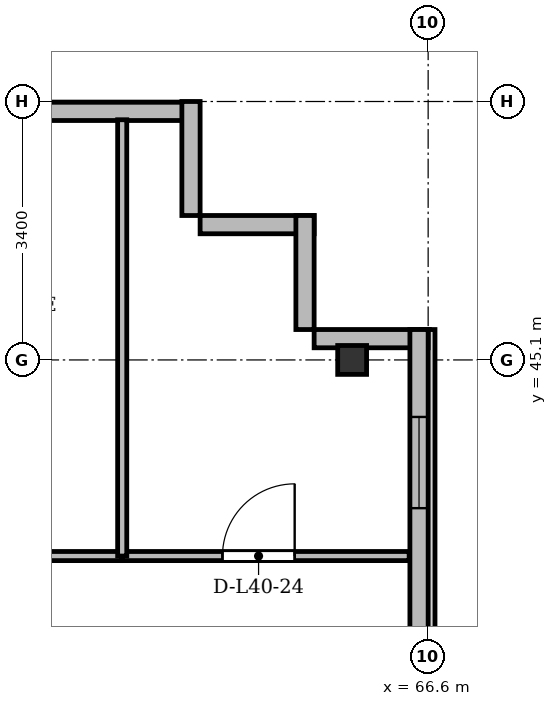
"""IFC4 building model, lengths in metres.
Left out: names, types, materials, properties, quantities, classifications, styles, units other than length and angle.
Written with IfcOpenShell. Run it as: python <this file> out.ifc"""

import sys

from ifc_helpers import new_model, si_unit, direction, frame, frame_2d, origin, origin_2d, place, context, subcontext, project, spatial, rectangle, i_section, extrude, source, transform, mapped, element, fill, save


model = new_model("IFC4")
c1 = context("Model", 3, precision=1e-05, world=origin(), true_north=direction((0.0, 1.0)))
c2 = subcontext(c1, "Body", "Model", "MODEL_VIEW")
j1 = project(units=[si_unit("LENGTHUNIT", "METRE"), si_unit("PLANEANGLEUNIT", "RADIAN")], contexts=[c1])
p1 = place(None, origin())
s1 = spatial("IfcSite", under=j1, at=p1, CompositionType="ELEMENT")
p2 = place(p1, origin())
s2 = spatial("IfcBuilding", under=s1, at=p2, CompositionType="ELEMENT")
p3 = place(p2, frame((0.0, 0.0, 153.7)))
s3 = spatial("IfcBuildingStorey", under=s2, at=p3, CompositionType="ELEMENT", Elevation=153.7)
m1 = source(origin(), c2, "Body", "SweptSolid", [
    extrude(i_section(OverallWidth=0.38, OverallDepth=0.38, WebThickness=0.02, FlangeThickness=0.03, at=origin_2d()), origin(), (0.0, 0.0, 1.0), 3.6),
])
p4 = place(p3, frame((65.6, 45.1, 0.0), z_axis=(0.0, 0.0, 1.0), x_axis=(1.0, 0.0, 0.0)))
e1 = element("IfcColumn", 1, at=p4, inside=s3, PredefinedType="COLUMN", context=c2, shape_type="MappedRepresentation", body=[
    mapped(m1, transform((0.0, 0.0, 0.0), x_axis=(1.0, 0.0, 0.0), y_axis=(0.0, 1.0, 0.0), z_axis=(0.0, 0.0, 1.0), scale=1.0)),
])
p5 = place(p3, frame((58.8, 48.37, 0.0), z_axis=(0.0, 0.0, 1.0), x_axis=(1.0, 0.0, 0.0)))
e2 = element("IfcWall", 2, at=p5, inside=s3, PredefinedType="SOLIDWALL", context=c2, shape_type="SweptSolid", body=[
    extrude(rectangle(XDim=4.7, YDim=0.24, at=frame_2d((2.35, 0.0))), origin(), (0.0, 0.0, 1.0), 3.35),
])
p6 = place(p5, frame((1.368, 0.0, 0.9)))
e3 = element("IfcOpeningElement", 3, at=p6, cuts=e2, PredefinedType="OPENING", context=c2, shape_type="SweptSolid", body=[
    extrude(rectangle(XDim=1.2, YDim=1.65, at=frame_2d((0.6, 0.825))), frame((0.0, 0.13, 0.0), z_axis=(0.0, -1.0, 0.0), x_axis=(1.0, 0.0, 0.0)), (0.0, 0.0, 1.0), 0.26),
])
for number, where, z_axis, x_axis in (
    (4, (63.48, 48.5, 0.0), (0.0, 0.0, 1.0), (0.0, -1.0, 0.0)),
    (5, (63.6, 46.88, 0.0), (0.0, 0.0, 1.0), (1.0, 0.0, 0.0)),
    (6, (64.98, 47.0, 0.0), (0.0, 0.0, 1.0), (0.0, -1.0, 0.0)),
    (7, (65.1, 45.38, 0.0), (0.0, 0.0, 1.0), (1.0, 0.0, 0.0)),
):
    element("IfcWall", number, at=place(p3, frame(where, z_axis=z_axis, x_axis=x_axis)), inside=s3, PredefinedType="SOLIDWALL", context=c2, shape_type="SweptSolid", body=[
        extrude(rectangle(XDim=1.5, YDim=0.24, at=frame_2d((0.75, 0.0))), origin(), (0.0, 0.0, 1.0), 3.35),
    ])
p7 = place(p3, frame((66.48, 45.5, 0.0), z_axis=(0.0, 0.0, 1.0), x_axis=(0.0, -1.0, 0.0)))
e8 = element("IfcWall", 8, at=p7, inside=s3, PredefinedType="SOLIDWALL", context=c2, shape_type="SweptSolid", body=[
    extrude(rectangle(XDim=39.2, YDim=0.24, at=frame_2d((19.6, 0.0))), origin(), (0.0, 0.0, 1.0), 3.35),
])
p8 = place(p7, frame((36.55, 0.0, 0.92)))
e9 = element("IfcOpeningElement", 9, at=p8, cuts=e8, PredefinedType="OPENING", context=c2, shape_type="SweptSolid", body=[
    extrude(rectangle(XDim=1.2, YDim=1.65, at=frame_2d((0.6, 0.825))), frame((0.0, 0.13, 0.0), z_axis=(0.0, -1.0, 0.0), x_axis=(1.0, 0.0, 0.0)), (0.0, 0.0, 1.0), 0.26),
])
p9 = place(p7, frame((32.8, 0.0, 0.92)))
e10 = element("IfcOpeningElement", 10, at=p9, cuts=e8, PredefinedType="OPENING", context=c2, shape_type="SweptSolid", body=[
    extrude(rectangle(XDim=2.6, YDim=1.9, at=frame_2d((1.3, 0.95))), frame((0.0, 0.13, 0.0), z_axis=(0.0, -1.0, 0.0), x_axis=(1.0, 0.0, 0.0)), (0.0, 0.0, 1.0), 0.26),
])
p10 = place(p7, frame((28.6, 0.0, 0.92)))
e11 = element("IfcOpeningElement", 11, at=p10, cuts=e8, PredefinedType="OPENING", context=c2, shape_type="SweptSolid", body=[
    extrude(rectangle(XDim=2.6, YDim=1.9, at=frame_2d((1.3, 0.95))), frame((0.0, 0.13, 0.0), z_axis=(0.0, -1.0, 0.0), x_axis=(1.0, 0.0, 0.0)), (0.0, 0.0, 1.0), 0.26),
])
p11 = place(p7, frame((21.4, 0.0, 0.92)))
e12 = element("IfcOpeningElement", 12, at=p11, cuts=e8, PredefinedType="OPENING", context=c2, shape_type="SweptSolid", body=[
    extrude(rectangle(XDim=2.6, YDim=1.9, at=frame_2d((1.3, 0.95))), frame((0.0, 0.13, 0.0), z_axis=(0.0, -1.0, 0.0), x_axis=(1.0, 0.0, 0.0)), (0.0, 0.0, 1.0), 0.26),
])
p12 = place(p7, frame((7.4, 0.0, 0.92)))
e13 = element("IfcOpeningElement", 13, at=p12, cuts=e8, PredefinedType="OPENING", context=c2, shape_type="SweptSolid", body=[
    extrude(rectangle(XDim=2.6, YDim=1.9, at=frame_2d((1.3, 0.95))), frame((0.0, 0.13, 0.0), z_axis=(0.0, -1.0, 0.0), x_axis=(1.0, 0.0, 0.0)), (0.0, 0.0, 1.0), 0.26),
])
p13 = place(p7, frame((4.5, 0.0, 0.92)))
e14 = element("IfcOpeningElement", 14, at=p13, cuts=e8, PredefinedType="OPENING", context=c2, shape_type="SweptSolid", body=[
    extrude(rectangle(XDim=1.2, YDim=1.65, at=frame_2d((0.6, 0.825))), frame((0.0, 0.13, 0.0), z_axis=(0.0, -1.0, 0.0), x_axis=(1.0, 0.0, 0.0)), (0.0, 0.0, 1.0), 0.26),
])
p14 = place(p7, frame((1.15, 0.0, 0.92)))
e15 = element("IfcOpeningElement", 15, at=p14, cuts=e8, PredefinedType="OPENING", context=c2, shape_type="SweptSolid", body=[
    extrude(rectangle(XDim=1.2, YDim=1.65, at=frame_2d((0.6, 0.825))), frame((0.0, 0.13, 0.0), z_axis=(0.0, -1.0, 0.0), x_axis=(1.0, 0.0, 0.0)), (0.0, 0.0, 1.0), 0.26),
])
p15 = place(p3, frame((58.8, 42.52, 0.0), z_axis=(0.0, 0.0, 1.0), x_axis=(1.0, 0.0, 0.0)))
e16 = element("IfcWall", 16, at=p15, inside=s3, PredefinedType="PARTITIONING", context=c2, shape_type="SweptSolid", body=[
    extrude(rectangle(XDim=3.775, YDim=0.12, at=frame_2d((1.887, 0.0))), origin(), (0.0, 0.0, 1.0), 2.85),
])
p16 = place(p15, frame((1.506, 0.0, 0.0)))
e17 = element("IfcOpeningElement", 17, at=p16, cuts=e16, PredefinedType="OPENING", context=c2, shape_type="SweptSolid", body=[
    extrude(rectangle(XDim=0.95, YDim=2.15, at=frame_2d((0.475, 1.075))), frame((0.0, 0.07, 0.0), z_axis=(0.0, -1.0, 0.0), x_axis=(1.0, 0.0, 0.0)), (0.0, 0.0, 1.0), 0.14),
])
p17 = place(p3, frame((62.575, 42.52, 0.0), z_axis=(0.0, 0.0, 1.0), x_axis=(1.0, 0.0, 0.0)))
e18 = element("IfcWall", 18, at=p17, inside=s3, PredefinedType="PARTITIONING", context=c2, shape_type="SweptSolid", body=[
    extrude(rectangle(XDim=3.775, YDim=0.12, at=frame_2d((1.888, 0.0))), origin(), (0.0, 0.0, 1.0), 2.85),
])
p18 = place(p17, frame((1.319, 0.0, 0.0)))
e19 = element("IfcOpeningElement", 19, at=p18, cuts=e18, PredefinedType="OPENING", context=c2, shape_type="SweptSolid", body=[
    extrude(rectangle(XDim=0.95, YDim=2.15, at=frame_2d((0.475, 1.075))), frame((0.0, 0.07, 0.0), z_axis=(0.0, -1.0, 0.0), x_axis=(1.0, 0.0, 0.0)), (0.0, 0.0, 1.0), 0.14),
])
p19 = place(p3, frame((62.575, 42.52, 0.0), z_axis=(0.0, 0.0, 1.0), x_axis=(0.0, 1.0, 0.0)))
e20 = element("IfcWall", 20, at=p19, inside=s3, PredefinedType="PARTITIONING", context=c2, shape_type="SweptSolid", body=[
    extrude(rectangle(XDim=5.74, YDim=0.12, at=frame_2d((2.87, 0.0))), origin(), (0.0, 0.0, 1.0), 2.75),
])
m2 = source(origin(), c2, "Body", "SweptSolid", [
    extrude(rectangle(XDim=1.2, YDim=1.65, at=frame_2d((0.6, 0.825))), frame((0.0, 0.03, 0.0), z_axis=(0.0, -1.0, 0.0), x_axis=(1.0, 0.0, 0.0)), (0.0, 0.0, 1.0), 0.06),
])
p20 = place(p14, origin())
e21 = element("IfcWindow", 21, at=p20, inside=s3, PartitioningType="SINGLE_PANEL", PredefinedType="WINDOW", context=c2, shape_type="MappedRepresentation", body=[
    mapped(m2, transform((0.0, 0.0, 0.0), x_axis=(1.0, 0.0, 0.0), y_axis=(0.0, 1.0, 0.0), z_axis=(0.0, 0.0, 1.0), scale=1.0)),
])
fill(e15, e21)
m3 = source(origin(), c2, "Body", "SweptSolid", [
    extrude(rectangle(XDim=0.95, YDim=2.15, at=frame_2d((0.475, 1.075))), frame((0.0, 0.025, 0.0), z_axis=(0.0, -1.0, 0.0), x_axis=(1.0, 0.0, 0.0)), (0.0, 0.0, 1.0), 0.05),
])
p21 = place(p18, origin())
e22 = element("IfcDoor", 22, at=p21, inside=s3, OperationType="SINGLE_SWING_RIGHT", PredefinedType="DOOR", context=c2, shape_type="MappedRepresentation", body=[
    mapped(m3, transform((0.0, 0.0, 0.0), x_axis=(1.0, 0.0, 0.0), y_axis=(0.0, 1.0, 0.0), z_axis=(0.0, 0.0, 1.0), scale=1.0)),
])
fill(e19, e22)
save(model, sys.argv[1])
